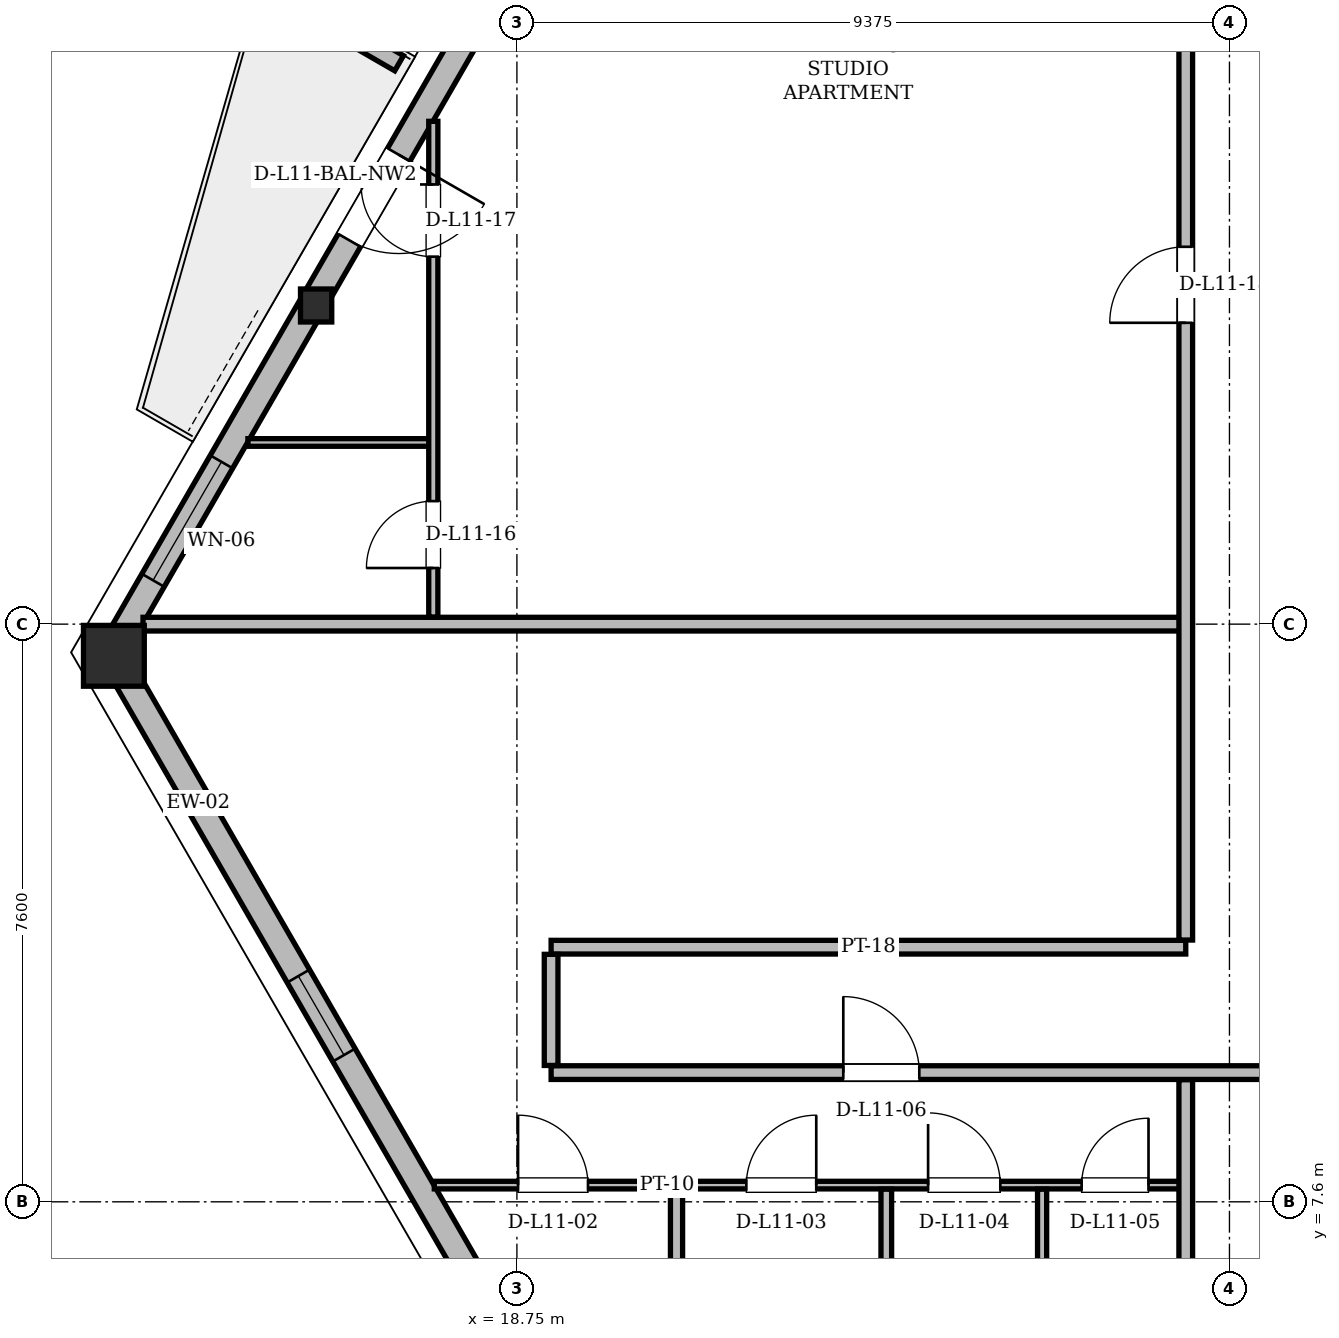
"""IFC4 building model, lengths in metres.
Left out: names, types, materials, properties, quantities, classifications, styles, units other than length and angle.
Written with IfcOpenShell. Run it as: python <this file> out.ifc"""

import sys

from ifc_helpers import new_model, si_unit, direction, frame, frame_2d, origin, origin_2d, place, context, subcontext, project, spatial, polyline, rectangle, hollow_rectangle, i_section, outline, extrude, element, fill, save


model = new_model("IFC4")
c1 = context("Model", 3, precision=1e-05, world=origin(), true_north=direction((0.0, 1.0)))
c2 = subcontext(c1, "Body", "Model", "MODEL_VIEW")
j1 = project(units=[si_unit("LENGTHUNIT", "METRE"), si_unit("PLANEANGLEUNIT", "RADIAN")], contexts=[c1])
p1 = place(None, origin())
s1 = spatial("IfcSite", under=j1, at=p1, CompositionType="ELEMENT")
p2 = place(p1, origin())
s2 = spatial("IfcBuilding", under=s1, at=p2, CompositionType="ELEMENT")
p3 = place(p2, frame((0.0, 0.0, 45.3)))
s3 = spatial("IfcBuildingStorey", under=s2, at=p3, CompositionType="ELEMENT", Elevation=45.3)
p4 = place(p3, frame((13.416, 14.829, 0.004), z_axis=(0.017667783295, -0.025414426739, 0.999520863388), x_axis=(0.821084150481, 0.570807163436, 0.0)))
e1 = element("IfcColumn", 1, at=p4, inside=s3, PredefinedType="COLUMN", context=c2, shape_type="SweptSolid", body=[
    extrude(hollow_rectangle(XDim=0.8, YDim=0.8, WallThickness=0.065, at=origin_2d()), origin(), (0.0, 0.0, 1.0), 3.593),
])
p5 = place(p3, frame((16.073, 19.431, 0.004), z_axis=(0.019775257889, -0.021745988056, 0.999567932248), x_axis=(0.739835449706, 0.672787862077, 0.0)))
e2 = element("IfcColumn", 2, at=p5, inside=s3, PredefinedType="COLUMN", context=c2, shape_type="SweptSolid", body=[
    extrude(i_section(OverallWidth=0.411, OverallDepth=0.434, WebThickness=0.036, FlangeThickness=0.057, at=origin_2d()), origin(), (0.0, 0.0, 1.0), 3.593),
])
p6 = place(p3, frame((13.416, 14.829, 0.0), z_axis=(0.0, 0.0, 1.0), x_axis=(0.499989538455, -0.866031443676, 0.0)))
e3 = element("IfcWall", 3, at=p6, inside=s3, PredefinedType="SOLIDWALL", context=c2, shape_type="SweptSolid", body=[
    extrude(rectangle(XDim=14.955, YDim=0.34, at=frame_2d((7.478, 0.0))), origin(), (0.0, 0.0, 1.0), 2.494),
])
p7 = place(p6, frame((4.918, 0.0, 0.85)))
e4 = element("IfcOpeningElement", 4, at=p7, cuts=e3, PredefinedType="OPENING", context=c2, shape_type="SweptSolid", body=[
    extrude(rectangle(XDim=1.2, YDim=1.48, at=frame_2d((0.6, 0.74))), frame((0.0, 0.17, 0.0), z_axis=(0.0, -1.0, 0.0), x_axis=(1.0, 0.0, 0.0)), (0.0, 0.0, 1.0), 0.34),
])
p8 = place(p6, frame((11.156, 0.0, 0.85)))
e5 = element("IfcOpeningElement", 5, at=p8, cuts=e3, PredefinedType="OPENING", context=c2, shape_type="SweptSolid", body=[
    extrude(rectangle(XDim=1.2, YDim=1.48, at=frame_2d((0.6, 0.74))), frame((0.0, 0.17, 0.0), z_axis=(0.0, -1.0, 0.0), x_axis=(1.0, 0.0, 0.0)), (0.0, 0.0, 1.0), 0.34),
])
p9 = place(p3, frame((30.023, 43.593, 0.0), z_axis=(0.0, 0.0, 1.0), x_axis=(-0.500004112523, -0.866023029405, 0.0)))
e6 = element("IfcWall", 6, at=p9, inside=s3, PredefinedType="SOLIDWALL", context=c2, shape_type="SweptSolid", body=[
    extrude(rectangle(XDim=33.214, YDim=0.34, at=frame_2d((16.607, 0.0))), origin(), (0.0, 0.0, 1.0), 2.494),
])
p10 = place(p9, frame((7.615, 0.0, 0.0)))
e7 = element("IfcOpeningElement", 7, at=p10, cuts=e6, PredefinedType="OPENING", context=c2, shape_type="SweptSolid", body=[
    extrude(rectangle(XDim=1.5, YDim=2.2, at=frame_2d((0.75, 1.1))), frame((0.0, 0.17, 0.0), z_axis=(0.0, -1.0, 0.0), x_axis=(1.0, 0.0, 0.0)), (0.0, 0.0, 1.0), 0.34),
])
p11 = place(p9, frame((25.655, 0.0, 0.0)))
e8 = element("IfcOpeningElement", 8, at=p11, cuts=e6, PredefinedType="OPENING", context=c2, shape_type="SweptSolid", body=[
    extrude(rectangle(XDim=1.3, YDim=2.2, at=frame_2d((0.65, 1.1))), frame((0.0, 0.17, 0.0), z_axis=(0.0, -1.0, 0.0), x_axis=(1.0, 0.0, 0.0)), (0.0, 0.0, 1.0), 0.34),
])
p12 = place(p9, frame((11.292, 0.0, 0.85)))
e9 = element("IfcOpeningElement", 9, at=p12, cuts=e6, PredefinedType="OPENING", context=c2, shape_type="SweptSolid", body=[
    extrude(rectangle(XDim=2.0, YDim=1.534, at=frame_2d((1.0, 0.767))), frame((0.0, 0.17, 0.0), z_axis=(0.0, -1.0, 0.0), x_axis=(1.0, 0.0, 0.0)), (0.0, 0.0, 1.0), 0.34),
])
p13 = place(p9, frame((18.731, 0.0, 0.85)))
e10 = element("IfcOpeningElement", 10, at=p13, cuts=e6, PredefinedType="OPENING", context=c2, shape_type="SweptSolid", body=[
    extrude(rectangle(XDim=1.4, YDim=1.534, at=frame_2d((0.7, 0.767))), frame((0.0, 0.17, 0.0), z_axis=(0.0, -1.0, 0.0), x_axis=(1.0, 0.0, 0.0)), (0.0, 0.0, 1.0), 0.34),
])
p14 = place(p9, frame((30.32, 0.0, 0.85)))
e11 = element("IfcOpeningElement", 11, at=p14, cuts=e6, PredefinedType="OPENING", context=c2, shape_type="SweptSolid", body=[
    extrude(rectangle(XDim=1.8, YDim=1.534, at=frame_2d((0.9, 0.767))), frame((0.0, 0.17, 0.0), z_axis=(0.0, -1.0, 0.0), x_axis=(1.0, 0.0, 0.0)), (0.0, 0.0, 1.0), 0.34),
])
p15 = place(p3, frame((17.2, 22.58, 0.0), z_axis=(0.0, 0.0, 1.0), x_axis=(-0.866042246008, 0.499970827278, 0.0)))
e12 = element("IfcWall", 12, at=p15, inside=s3, PredefinedType="PARAPET", context=c2, shape_type="SweptSolid", body=[
    extrude(outline(polyline([(0.0, 0.0), (2.042, 0.0), (2.042, 1.1), (0.0, 1.32), (0.0, 0.0)])), frame((0.0, 0.115, 0.0), z_axis=(0.0, -1.0, 0.0), x_axis=(1.0, 0.0, 0.0)), (0.0, 0.0, 1.0), 0.23),
])
p16 = place(p3, frame((17.663, 7.82, 0.0), z_axis=(0.0, 0.0, 1.0), x_axis=(1.0, 0.0, 0.0)))
e13 = element("IfcWall", 13, at=p16, inside=s3, PredefinedType="PARTITIONING", context=c2, shape_type="SweptSolid", body=[
    extrude(rectangle(XDim=9.937, YDim=0.1, at=frame_2d((4.969, 0.0))), origin(), (0.0, 0.0, 1.0), 2.738),
])
p17 = place(p16, frame((1.102, 0.0, 0.0)))
e14 = element("IfcOpeningElement", 14, at=p17, cuts=e13, PredefinedType="OPENING", context=c2, shape_type="SweptSolid", body=[
    extrude(rectangle(XDim=0.92, YDim=2.12, at=frame_2d((0.46, 1.06))), frame((0.0, 0.05, 0.0), z_axis=(0.0, -1.0, 0.0), x_axis=(1.0, 0.0, 0.0)), (0.0, 0.0, 1.0), 0.1),
])
p18 = place(p16, frame((4.105, 0.0, 0.0)))
e15 = element("IfcOpeningElement", 15, at=p18, cuts=e13, PredefinedType="OPENING", context=c2, shape_type="SweptSolid", body=[
    extrude(rectangle(XDim=0.92, YDim=2.12, at=frame_2d((0.46, 1.06))), frame((0.0, 0.05, 0.0), z_axis=(0.0, -1.0, 0.0), x_axis=(1.0, 0.0, 0.0)), (0.0, 0.0, 1.0), 0.1),
])
p19 = place(p16, frame((6.497, 0.0, 0.0)))
e16 = element("IfcOpeningElement", 16, at=p19, cuts=e13, PredefinedType="OPENING", context=c2, shape_type="SweptSolid", body=[
    extrude(rectangle(XDim=0.95, YDim=2.1, at=frame_2d((0.475, 1.05))), frame((0.0, 0.05, 0.0), z_axis=(0.0, -1.0, 0.0), x_axis=(1.0, 0.0, 0.0)), (0.0, 0.0, 1.0), 0.1),
])
p20 = place(p16, frame((8.517, 0.0, 0.0)))
e17 = element("IfcOpeningElement", 17, at=p20, cuts=e13, PredefinedType="OPENING", context=c2, shape_type="SweptSolid", body=[
    extrude(rectangle(XDim=0.88, YDim=2.08, at=frame_2d((0.44, 1.04))), frame((0.0, 0.05, 0.0), z_axis=(0.0, -1.0, 0.0), x_axis=(1.0, 0.0, 0.0)), (0.0, 0.0, 1.0), 0.1),
])
p21 = place(p3, frame((19.2, 9.3, 0.0), z_axis=(0.0, 0.0, 1.0), x_axis=(1.0, 0.0, 0.0)))
e18 = element("IfcWall", 18, at=p21, inside=s3, PredefinedType="PARTITIONING", context=c2, shape_type="SweptSolid", body=[
    extrude(rectangle(XDim=36.6, YDim=0.18, at=frame_2d((18.3, 0.0))), origin(), (0.0, 0.0, 1.0), 2.738),
])
p22 = place(p21, frame((3.844, 0.0, 0.0)))
e19 = element("IfcOpeningElement", 19, at=p22, cuts=e18, PredefinedType="OPENING", context=c2, shape_type="SweptSolid", body=[
    extrude(rectangle(XDim=1.0, YDim=2.18, at=frame_2d((0.5, 1.09))), frame((0.0, 0.09, 0.0), z_axis=(0.0, -1.0, 0.0), x_axis=(1.0, 0.0, 0.0)), (0.0, 0.0, 1.0), 0.18),
])
p23 = place(p21, frame((11.825, 0.0, 0.0)))
e20 = element("IfcOpeningElement", 20, at=p23, cuts=e18, PredefinedType="OPENING", context=c2, shape_type="SweptSolid", body=[
    extrude(rectangle(XDim=1.0, YDim=2.18, at=frame_2d((0.5, 1.09))), frame((0.0, 0.09, 0.0), z_axis=(0.0, -1.0, 0.0), x_axis=(1.0, 0.0, 0.0)), (0.0, 0.0, 1.0), 0.18),
])
p24 = place(p21, frame((20.387, 0.0, 0.0)))
e21 = element("IfcOpeningElement", 21, at=p24, cuts=e18, PredefinedType="OPENING", context=c2, shape_type="SweptSolid", body=[
    extrude(rectangle(XDim=1.0, YDim=2.18, at=frame_2d((0.5, 1.09))), frame((0.0, 0.09, 0.0), z_axis=(0.0, -1.0, 0.0), x_axis=(1.0, 0.0, 0.0)), (0.0, 0.0, 1.0), 0.18),
])
p25 = place(p21, frame((31.904, 0.0, 0.0)))
e22 = element("IfcOpeningElement", 22, at=p25, cuts=e18, PredefinedType="OPENING", context=c2, shape_type="SweptSolid", body=[
    extrude(rectangle(XDim=1.0, YDim=2.18, at=frame_2d((0.5, 1.09))), frame((0.0, 0.09, 0.0), z_axis=(0.0, -1.0, 0.0), x_axis=(1.0, 0.0, 0.0)), (0.0, 0.0, 1.0), 0.18),
])
p26 = place(p3, frame((19.2, 10.95, 0.0), z_axis=(0.0, 0.0, 1.0), x_axis=(1.0, 0.0, 0.0)))
e23 = element("IfcWall", 23, at=p26, inside=s3, PredefinedType="PARTITIONING", context=c2, shape_type="SweptSolid", body=[
    extrude(rectangle(XDim=8.35, YDim=0.18, at=frame_2d((4.175, 0.0))), origin(), (0.0, 0.0, 1.0), 3.36),
])
p27 = place(p3, frame((13.831, 15.2, 0.0), z_axis=(0.0, 0.0, 1.0), x_axis=(1.0, 0.0, 0.0)))
e24 = element("IfcWall", 24, at=p27, inside=s3, PredefinedType="PARTITIONING", context=c2, shape_type="SweptSolid", body=[
    extrude(rectangle(XDim=13.719, YDim=0.18, at=frame_2d((6.86, 0.0))), origin(), (0.0, 0.0, 1.0), 2.494),
])
p28 = place(p3, frame((15.211, 17.59, 0.0), z_axis=(0.0, 0.0, 1.0), x_axis=(1.0, 0.0, 0.0)))
e25 = element("IfcWall", 25, at=p28, inside=s3, PredefinedType="PARTITIONING", context=c2, shape_type="SweptSolid", body=[
    extrude(rectangle(XDim=2.441, YDim=0.1, at=frame_2d((1.221, 0.0))), origin(), (0.0, 0.0, 1.0), 3.36),
])
p29 = place(p3, frame((17.65, 15.294, 0.0), z_axis=(0.0, 0.0, 1.0), x_axis=(0.0, 1.0, 0.0)))
e26 = element("IfcWall", 26, at=p29, inside=s3, PredefinedType="PARTITIONING", context=c2, shape_type="SweptSolid", body=[
    extrude(rectangle(XDim=6.521, YDim=0.12, at=frame_2d((3.261, 0.0))), origin(), (0.0, 0.0, 1.0), 2.494),
])
p30 = place(p29, frame((0.645, 0.0, 0.0)))
e27 = element("IfcOpeningElement", 27, at=p30, cuts=e26, PredefinedType="OPENING", context=c2, shape_type="SweptSolid", body=[
    extrude(rectangle(XDim=0.88, YDim=2.08, at=frame_2d((0.44, 1.04))), frame((0.0, 0.06, 0.0), z_axis=(0.0, -1.0, 0.0), x_axis=(1.0, 0.0, 0.0)), (0.0, 0.0, 1.0), 0.12),
])
p31 = place(p29, frame((4.74, 0.0, 0.0)))
e28 = element("IfcOpeningElement", 28, at=p31, cuts=e26, PredefinedType="OPENING", context=c2, shape_type="SweptSolid", body=[
    extrude(rectangle(XDim=0.95, YDim=2.1, at=frame_2d((0.475, 1.05))), frame((0.0, 0.06, 0.0), z_axis=(0.0, -1.0, 0.0), x_axis=(1.0, 0.0, 0.0)), (0.0, 0.0, 1.0), 0.12),
])
p32 = place(p3, frame((19.2, 9.394, 0.0), z_axis=(0.0, 0.0, 1.0), x_axis=(0.0, 1.0, 0.0)))
e29 = element("IfcWall", 29, at=p32, inside=s3, PredefinedType="PARTITIONING", context=c2, shape_type="SweptSolid", body=[
    extrude(rectangle(XDim=1.462, YDim=0.18, at=frame_2d((0.731, 0.0))), origin(), (0.0, 0.0, 1.0), 3.36),
])
p33 = place(p3, frame((20.85, 2.343, 0.0), z_axis=(0.0, 0.0, 1.0), x_axis=(0.0, 1.0, 0.0)))
e30 = element("IfcWall", 30, at=p33, inside=s3, PredefinedType="PARTITIONING", context=c2, shape_type="SweptSolid", body=[
    extrude(rectangle(XDim=5.423, YDim=0.16, at=frame_2d((2.711, 0.0))), origin(), (0.0, 0.0, 1.0), 3.36),
])
p34 = place(p3, frame((23.61, 2.052, 0.0), z_axis=(0.0, 0.0, 1.0), x_axis=(0.0, 1.0, 0.0)))
e31 = element("IfcWall", 31, at=p34, inside=s3, PredefinedType="PARTITIONING", context=c2, shape_type="SweptSolid", body=[
    extrude(rectangle(XDim=5.714, YDim=0.14, at=frame_2d((2.857, 0.0))), origin(), (0.0, 0.0, 1.0), 2.738),
])
p35 = place(p3, frame((25.66, 2.052, 0.0), z_axis=(0.0, 0.0, 1.0), x_axis=(0.0, 1.0, 0.0)))
e32 = element("IfcWall", 32, at=p35, inside=s3, PredefinedType="PARTITIONING", context=c2, shape_type="SweptSolid", body=[
    extrude(rectangle(XDim=5.714, YDim=0.12, at=frame_2d((2.857, 0.0))), origin(), (0.0, 0.0, 1.0), 2.738),
])
p36 = place(p3, frame((27.55, 2.052, 0.0), z_axis=(0.0, 0.0, 1.0), x_axis=(0.0, 1.0, 0.0)))
e33 = element("IfcWall", 33, at=p36, inside=s3, PredefinedType="PARTITIONING", context=c2, shape_type="SweptSolid", body=[
    extrude(rectangle(XDim=7.154, YDim=0.18, at=frame_2d((3.577, 0.0))), origin(), (0.0, 0.0, 1.0), 2.738),
])
p37 = place(p3, frame((27.55, 11.044, 0.0), z_axis=(0.0, 0.0, 1.0), x_axis=(0.0, 1.0, 0.0)))
e34 = element("IfcWall", 34, at=p37, inside=s3, PredefinedType="PARTITIONING", context=c2, shape_type="SweptSolid", body=[
    extrude(rectangle(XDim=27.715, YDim=0.18, at=frame_2d((13.858, 0.0))), origin(), (0.0, 0.0, 1.0), 2.738),
])
p38 = place(p37, frame((8.121, 0.0, 0.0)))
e35 = element("IfcOpeningElement", 35, at=p38, cuts=e34, PredefinedType="OPENING", context=c2, shape_type="SweptSolid", body=[
    extrude(rectangle(XDim=1.0, YDim=2.18, at=frame_2d((0.5, 1.09))), frame((0.0, 0.09, 0.0), z_axis=(0.0, -1.0, 0.0), x_axis=(1.0, 0.0, 0.0)), (0.0, 0.0, 1.0), 0.18),
])
p39 = place(p11, origin())
e36 = element("IfcDoor", 36, at=p39, inside=s3, OperationType="SINGLE_SWING_LEFT", PredefinedType="DOOR", context=c2, shape_type="SweptSolid", body=[
    extrude(rectangle(XDim=1.3, YDim=2.2, at=frame_2d((0.65, 1.1))), frame((0.0, 0.025, 0.0), z_axis=(0.0, -1.0, 0.0), x_axis=(1.0, 0.0, 0.0)), (0.0, 0.0, 1.0), 0.05),
])
fill(e8, e36)
p40 = place(p14, origin())
e37 = element("IfcWindow", 37, at=p40, inside=s3, PartitioningType="SINGLE_PANEL", PredefinedType="WINDOW", context=c2, shape_type="SweptSolid", body=[
    extrude(rectangle(XDim=1.8, YDim=1.534, at=frame_2d((0.9, 0.767))), frame((0.0, 0.03, 0.0), z_axis=(0.0, -1.0, 0.0), x_axis=(1.0, 0.0, 0.0)), (0.0, 0.0, 1.0), 0.06),
])
fill(e11, e37)
p41 = place(p7, origin())
e38 = element("IfcWindow", 38, at=p41, inside=s3, PartitioningType="SINGLE_PANEL", PredefinedType="WINDOW", context=c2, shape_type="SweptSolid", body=[
    extrude(rectangle(XDim=1.2, YDim=1.48, at=frame_2d((0.6, 0.74))), frame((0.0, 0.03, 0.0), z_axis=(0.0, -1.0, 0.0), x_axis=(1.0, 0.0, 0.0)), (0.0, 0.0, 1.0), 0.06),
])
fill(e4, e38)
p42 = place(p17, origin())
e39 = element("IfcDoor", 39, at=p42, inside=s3, OperationType="SINGLE_SWING_LEFT", PredefinedType="DOOR", context=c2, shape_type="SweptSolid", body=[
    extrude(rectangle(XDim=0.92, YDim=2.12, at=frame_2d((0.46, 1.06))), frame((0.0, 0.025, 0.0), z_axis=(0.0, -1.0, 0.0), x_axis=(1.0, 0.0, 0.0)), (0.0, 0.0, 1.0), 0.05),
])
fill(e14, e39)
p43 = place(p18, origin())
e40 = element("IfcDoor", 40, at=p43, inside=s3, OperationType="SINGLE_SWING_RIGHT", PredefinedType="DOOR", context=c2, shape_type="SweptSolid", body=[
    extrude(rectangle(XDim=0.92, YDim=2.12, at=frame_2d((0.46, 1.06))), frame((0.0, 0.025, 0.0), z_axis=(0.0, -1.0, 0.0), x_axis=(1.0, 0.0, 0.0)), (0.0, 0.0, 1.0), 0.05),
])
fill(e15, e40)
p44 = place(p19, origin())
e41 = element("IfcDoor", 41, at=p44, inside=s3, OperationType="SINGLE_SWING_LEFT", PredefinedType="DOOR", context=c2, shape_type="SweptSolid", body=[
    extrude(rectangle(XDim=0.95, YDim=2.1, at=frame_2d((0.475, 1.05))), frame((0.0, 0.025, 0.0), z_axis=(0.0, -1.0, 0.0), x_axis=(1.0, 0.0, 0.0)), (0.0, 0.0, 1.0), 0.05),
])
fill(e16, e41)
p45 = place(p20, origin())
e42 = element("IfcDoor", 42, at=p45, inside=s3, OperationType="SINGLE_SWING_RIGHT", PredefinedType="DOOR", context=c2, shape_type="SweptSolid", body=[
    extrude(rectangle(XDim=0.88, YDim=2.08, at=frame_2d((0.44, 1.04))), frame((0.0, 0.025, 0.0), z_axis=(0.0, -1.0, 0.0), x_axis=(1.0, 0.0, 0.0)), (0.0, 0.0, 1.0), 0.05),
])
fill(e17, e42)
p46 = place(p22, origin())
e43 = element("IfcDoor", 43, at=p46, inside=s3, OperationType="SINGLE_SWING_LEFT", PredefinedType="DOOR", context=c2, shape_type="SweptSolid", body=[
    extrude(rectangle(XDim=1.0, YDim=2.18, at=frame_2d((0.5, 1.09))), frame((0.0, 0.025, 0.0), z_axis=(0.0, -1.0, 0.0), x_axis=(1.0, 0.0, 0.0)), (0.0, 0.0, 1.0), 0.05),
])
fill(e19, e43)
p47 = place(p30, origin())
e44 = element("IfcDoor", 44, at=p47, inside=s3, OperationType="SINGLE_SWING_LEFT", PredefinedType="DOOR", context=c2, shape_type="SweptSolid", body=[
    extrude(rectangle(XDim=0.88, YDim=2.08, at=frame_2d((0.44, 1.04))), frame((0.0, 0.025, 0.0), z_axis=(0.0, -1.0, 0.0), x_axis=(1.0, 0.0, 0.0)), (0.0, 0.0, 1.0), 0.05),
])
fill(e27, e44)
p48 = place(p31, origin())
e45 = element("IfcDoor", 45, at=p48, inside=s3, OperationType="SINGLE_SWING_RIGHT", PredefinedType="DOOR", context=c2, shape_type="SweptSolid", body=[
    extrude(rectangle(XDim=0.95, YDim=2.1, at=frame_2d((0.475, 1.05))), frame((0.0, 0.025, 0.0), z_axis=(0.0, -1.0, 0.0), x_axis=(1.0, 0.0, 0.0)), (0.0, 0.0, 1.0), 0.05),
])
fill(e28, e45)
p49 = place(p38, origin())
e46 = element("IfcDoor", 46, at=p49, inside=s3, OperationType="SINGLE_SWING_LEFT", PredefinedType="DOOR", context=c2, shape_type="SweptSolid", body=[
    extrude(rectangle(XDim=1.0, YDim=2.18, at=frame_2d((0.5, 1.09))), frame((0.0, 0.025, 0.0), z_axis=(0.0, -1.0, 0.0), x_axis=(1.0, 0.0, 0.0)), (0.0, 0.0, 1.0), 0.05),
])
fill(e35, e46)
save(model, sys.argv[1])
